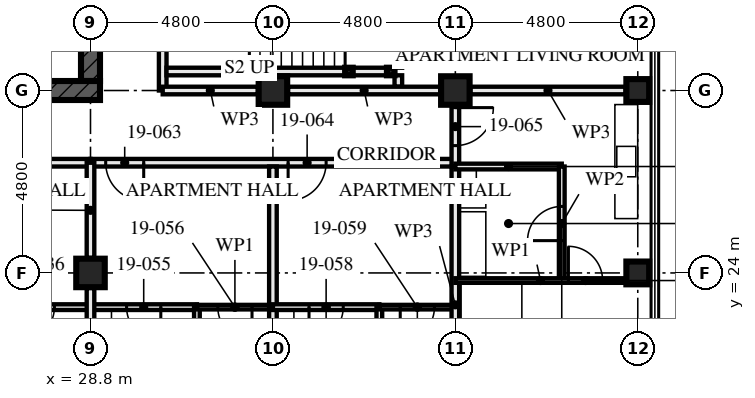
"""IFC4 building model, lengths in metres.
Left out: names, types, materials, properties, quantities, classifications, styles, units other than length and angle.
Written with IfcOpenShell. Run it as: python <this file> out.ifc"""

import sys

from ifc_helpers import new_model, si_unit, direction, frame, frame_2d, origin, origin_2d, place, context, subcontext, project, spatial, rectangle, hollow_rectangle, extrude, element, fill, save


model = new_model("IFC4")
c1 = context("Model", 3, precision=1e-05, world=origin(), true_north=direction((0.0, 1.0)))
c2 = subcontext(c1, "Body", "Model", "MODEL_VIEW")
j1 = project(units=[si_unit("LENGTHUNIT", "METRE"), si_unit("PLANEANGLEUNIT", "RADIAN")], contexts=[c1])
p1 = place(None, origin())
s1 = spatial("IfcSite", under=j1, at=p1, CompositionType="ELEMENT")
p2 = place(p1, origin())
s2 = spatial("IfcBuilding", under=s1, at=p2, CompositionType="ELEMENT")
p3 = place(p2, frame((0.0, 0.0, 72.5)))
s3 = spatial("IfcBuildingStorey", under=s2, at=p3, CompositionType="ELEMENT", Elevation=72.5)
for number, where, z_axis, x_axis in (
    (1, (28.8, 24.0, 0.0), (0.0, 0.0, 1.0), (1.0, 0.0, 0.0)),
    (2, (33.6, 28.8, 0.0), (0.0, 0.0, 1.0), (0.0, 1.0, 0.0)),
    (3, (38.4, 28.8, 0.0), (0.0, 0.0, 1.0), (0.0, 1.0, 0.0)),
):
    element("IfcColumn", number, at=place(p3, frame(where, z_axis=z_axis, x_axis=x_axis)), inside=s3, PredefinedType="COLUMN", context=c2, shape_type="SweptSolid", body=[
        extrude(hollow_rectangle(XDim=0.75, YDim=0.75, WallThickness=0.08, at=origin_2d()), origin(), (0.0, 0.0, 1.0), 3.5),
    ])
for number, where, z_axis, x_axis in (
    (4, (43.2, 24.0, 0.0), (0.0, 0.0, 1.0), (1.0, 0.0, 0.0)),
    (5, (43.2, 28.8, 0.0), (0.0, 0.0, 1.0), (0.0, 1.0, 0.0)),
):
    element("IfcColumn", number, at=place(p3, frame(where, z_axis=z_axis, x_axis=x_axis)), inside=s3, PredefinedType="COLUMN", context=c2, shape_type="SweptSolid", body=[
        extrude(hollow_rectangle(XDim=0.6, YDim=0.6, WallThickness=0.08, at=origin_2d()), origin(), (0.0, 0.0, 1.0), 3.5),
    ])
p4 = place(p3, frame((14.15, 28.8, -0.17), z_axis=(0.0, 0.0, 1.0), x_axis=(1.0, 0.0, 0.0)))
e6 = element("IfcWall", 6, at=p4, inside=s3, PredefinedType="SHEAR", context=c2, shape_type="SweptSolid", body=[
    extrude(rectangle(XDim=14.9, YDim=0.5, at=frame_2d((7.45, 0.0))), origin(), (0.0, 0.0, 1.0), 3.5),
])
p5 = place(p4, frame((6.85, 0.0, 0.17)))
e7 = element("IfcOpeningElement", 7, at=p5, cuts=e6, PredefinedType="OPENING", context=c2, shape_type="SweptSolid", body=[
    extrude(rectangle(XDim=1.2, YDim=2.1, at=frame_2d((0.6, 1.05))), frame((0.0, 0.26, 0.0), z_axis=(0.0, -1.0, 0.0), x_axis=(1.0, 0.0, 0.0)), (0.0, 0.0, 1.0), 0.521),
])
p6 = place(p3, frame((28.8, 29.05, -0.17), z_axis=(0.0, 0.0, 1.0), x_axis=(0.0, 1.0, 0.0)))
e8 = element("IfcWall", 8, at=p6, inside=s3, PredefinedType="SHEAR", context=c2, shape_type="SweptSolid", body=[
    extrude(rectangle(XDim=13.9, YDim=0.5, at=frame_2d((6.95, 0.0))), origin(), (0.0, 0.0, 1.0), 3.5),
])
p7 = place(p6, frame((6.35, 0.0, 0.17)))
e9 = element("IfcOpeningElement", 9, at=p7, cuts=e8, PredefinedType="OPENING", context=c2, shape_type="SweptSolid", body=[
    extrude(rectangle(XDim=1.2, YDim=2.1, at=frame_2d((0.6, 1.05))), frame((0.0, 0.26, 0.0), z_axis=(0.0, -1.0, 0.0), x_axis=(1.0, 0.0, 0.0)), (0.0, 0.0, 1.0), 0.521),
])
for number, where, z_axis, x_axis in (
    (10, (36.7, 29.3, 0.0), (0.0, 0.0, 1.0), (1.0, 0.0, 0.0)),
    (11, (35.6, 29.3, 0.0), (0.0, 0.0, 1.0), (1.0, 0.0, 0.0)),
):
    element("IfcColumn", number, at=place(p3, frame(where, z_axis=z_axis, x_axis=x_axis)), inside=s3, PredefinedType="COLUMN", context=c2, shape_type="SweptSolid", body=[
        extrude(hollow_rectangle(XDim=0.2, YDim=0.2, WallThickness=0.008, at=origin_2d()), origin(), (0.0, 0.0, 1.0), 3.33),
    ])
p8 = place(p3, frame((26.0, 23.1, 0.0), z_axis=(0.0, 0.0, 1.0), x_axis=(1.0, 0.0, 0.0)))
e12 = element("IfcWall", 12, at=p8, inside=s3, PredefinedType="PARTITIONING", context=c2, shape_type="SweptSolid", body=[
    extrude(rectangle(XDim=2.8, YDim=0.15, at=frame_2d((1.4, 0.0))), origin(), (0.0, 0.0, 1.0), 3.33),
])
p9 = place(p8, frame((0.95, 0.0, 0.0)))
e13 = element("IfcOpeningElement", 13, at=p9, cuts=e12, PredefinedType="OPENING", context=c2, shape_type="SweptSolid", body=[
    extrude(rectangle(XDim=0.9, YDim=2.1, at=frame_2d((0.45, 1.05))), frame((0.0, 0.085, 0.0), z_axis=(0.0, -1.0, 0.0), x_axis=(1.0, 0.0, 0.0)), (0.0, 0.0, 1.0), 0.171),
])
p10 = place(p3, frame((14.4, 26.9, 0.0), z_axis=(0.0, 0.0, 1.0), x_axis=(1.0, 0.0, 0.0)))
e14 = element("IfcWall", 14, at=p10, inside=s3, PredefinedType="PARTITIONING", context=c2, shape_type="SweptSolid", body=[
    extrude(rectangle(XDim=14.4, YDim=0.2, at=frame_2d((7.2, 0.0))), origin(), (0.0, 0.0, 1.0), 2.55),
])
p11 = place(p10, frame((1.4, 0.0, 0.0)))
e15 = element("IfcOpeningElement", 15, at=p11, cuts=e14, PredefinedType="OPENING", context=c2, shape_type="SweptSolid", body=[
    extrude(rectangle(XDim=1.0, YDim=2.1, at=frame_2d((0.5, 1.05))), frame((0.0, 0.111, 0.0), z_axis=(0.0, -1.0, 0.0), x_axis=(1.0, 0.0, 0.0)), (0.0, 0.0, 1.0), 0.221),
])
p12 = place(p10, frame((3.65, 0.0, 0.0)))
e16 = element("IfcOpeningElement", 16, at=p12, cuts=e14, PredefinedType="OPENING", context=c2, shape_type="SweptSolid", body=[
    extrude(rectangle(XDim=0.9, YDim=2.1, at=frame_2d((0.45, 1.05))), frame((0.0, 0.111, 0.0), z_axis=(0.0, -1.0, 0.0), x_axis=(1.0, 0.0, 0.0)), (0.0, 0.0, 1.0), 0.221),
])
p13 = place(p10, frame((5.2, 0.0, 0.0)))
e17 = element("IfcOpeningElement", 17, at=p13, cuts=e14, PredefinedType="OPENING", context=c2, shape_type="SweptSolid", body=[
    extrude(rectangle(XDim=1.0, YDim=2.1, at=frame_2d((0.5, 1.05))), frame((0.0, 0.111, 0.0), z_axis=(0.0, -1.0, 0.0), x_axis=(1.0, 0.0, 0.0)), (0.0, 0.0, 1.0), 0.221),
])
p14 = place(p10, frame((10.0, 0.0, 0.0)))
e18 = element("IfcOpeningElement", 18, at=p14, cuts=e14, PredefinedType="OPENING", context=c2, shape_type="SweptSolid", body=[
    extrude(rectangle(XDim=1.0, YDim=2.1, at=frame_2d((0.5, 1.05))), frame((0.0, 0.111, 0.0), z_axis=(0.0, -1.0, 0.0), x_axis=(1.0, 0.0, 0.0)), (0.0, 0.0, 1.0), 0.221),
])
p15 = place(p3, frame((31.6, 20.1, 0.0), z_axis=(0.0, 0.0, 1.0), x_axis=(0.0, 1.0, 0.0)))
e19 = element("IfcWall", 19, at=p15, inside=s3, PredefinedType="PARTITIONING", context=c2, shape_type="SweptSolid", body=[
    extrude(rectangle(XDim=3.0, YDim=0.15, at=frame_2d((1.5, 0.0))), origin(), (0.0, 0.0, 1.0), 3.33),
])
p16 = place(p3, frame((28.8, 23.1, 0.0), z_axis=(0.0, 0.0, 1.0), x_axis=(1.0, 0.0, 0.0)))
e20 = element("IfcWall", 20, at=p16, inside=s3, PredefinedType="PARTITIONING", context=c2, shape_type="SweptSolid", body=[
    extrude(rectangle(XDim=2.8, YDim=0.15, at=frame_2d((1.4, 0.0))), origin(), (0.0, 0.0, 1.0), 3.33),
])
p17 = place(p16, frame((0.95, 0.0, 0.0)))
e21 = element("IfcOpeningElement", 21, at=p17, cuts=e20, PredefinedType="OPENING", context=c2, shape_type="SweptSolid", body=[
    extrude(rectangle(XDim=0.9, YDim=2.1, at=frame_2d((0.45, 1.05))), frame((0.0, 0.085, 0.0), z_axis=(0.0, -1.0, 0.0), x_axis=(1.0, 0.0, 0.0)), (0.0, 0.0, 1.0), 0.171),
])
p18 = place(p3, frame((31.6, 23.1, 0.0), z_axis=(0.0, 0.0, 1.0), x_axis=(1.0, 0.0, 0.0)))
e22 = element("IfcWall", 22, at=p18, inside=s3, PredefinedType="PARTITIONING", context=c2, shape_type="SweptSolid", body=[
    extrude(rectangle(XDim=2.0, YDim=0.12, at=frame_2d((1.0, 0.0))), origin(), (0.0, 0.0, 1.0), 3.33),
])
p19 = place(p18, frame((0.55, 0.0, 0.0)))
e23 = element("IfcOpeningElement", 23, at=p19, cuts=e22, PredefinedType="OPENING", context=c2, shape_type="SweptSolid", body=[
    extrude(rectangle(XDim=0.9, YDim=2.1, at=frame_2d((0.45, 1.05))), frame((0.0, 0.071, 0.0), z_axis=(0.0, -1.0, 0.0), x_axis=(1.0, 0.0, 0.0)), (0.0, 0.0, 1.0), 0.141),
])
p20 = place(p3, frame((33.6, 14.72, 0.0), z_axis=(0.0, 0.0, 1.0), x_axis=(0.0, 1.0, 0.0)))
e24 = element("IfcWall", 24, at=p20, inside=s3, PredefinedType="PARTITIONING", context=c2, shape_type="SweptSolid", body=[
    extrude(rectangle(XDim=12.08, YDim=0.2, at=frame_2d((6.04, 0.0))), origin(), (0.0, 0.0, 1.0), 2.55),
])
p21 = place(p3, frame((36.4, 20.1, 0.0), z_axis=(0.0, 0.0, 1.0), x_axis=(0.0, 1.0, 0.0)))
e25 = element("IfcWall", 25, at=p21, inside=s3, PredefinedType="PARTITIONING", context=c2, shape_type="SweptSolid", body=[
    extrude(rectangle(XDim=3.0, YDim=0.15, at=frame_2d((1.5, 0.0))), origin(), (0.0, 0.0, 1.0), 3.33),
])
p22 = place(p3, frame((33.6, 23.1, 0.0), z_axis=(0.0, 0.0, 1.0), x_axis=(1.0, 0.0, 0.0)))
e26 = element("IfcWall", 26, at=p22, inside=s3, PredefinedType="PARTITIONING", context=c2, shape_type="SweptSolid", body=[
    extrude(rectangle(XDim=2.8, YDim=0.15, at=frame_2d((1.4, 0.0))), origin(), (0.0, 0.0, 1.0), 3.33),
])
p23 = place(p22, frame((0.95, 0.0, 0.0)))
e27 = element("IfcOpeningElement", 27, at=p23, cuts=e26, PredefinedType="OPENING", context=c2, shape_type="SweptSolid", body=[
    extrude(rectangle(XDim=0.9, YDim=2.1, at=frame_2d((0.45, 1.05))), frame((0.0, 0.085, 0.0), z_axis=(0.0, -1.0, 0.0), x_axis=(1.0, 0.0, 0.0)), (0.0, 0.0, 1.0), 0.171),
])
p24 = place(p3, frame((36.4, 23.1, 0.0), z_axis=(0.0, 0.0, 1.0), x_axis=(1.0, 0.0, 0.0)))
e28 = element("IfcWall", 28, at=p24, inside=s3, PredefinedType="PARTITIONING", context=c2, shape_type="SweptSolid", body=[
    extrude(rectangle(XDim=2.0, YDim=0.12, at=frame_2d((1.0, 0.0))), origin(), (0.0, 0.0, 1.0), 3.33),
])
p25 = place(p24, frame((0.55, 0.0, 0.0)))
e29 = element("IfcOpeningElement", 29, at=p25, cuts=e28, PredefinedType="OPENING", context=c2, shape_type="SweptSolid", body=[
    extrude(rectangle(XDim=0.9, YDim=2.1, at=frame_2d((0.45, 1.05))), frame((0.0, 0.071, 0.0), z_axis=(0.0, -1.0, 0.0), x_axis=(1.0, 0.0, 0.0)), (0.0, 0.0, 1.0), 0.141),
])
p26 = place(p3, frame((38.4, 19.52, 0.0), z_axis=(0.0, 0.0, 1.0), x_axis=(0.0, 1.0, 0.0)))
e30 = element("IfcWall", 30, at=p26, inside=s3, PredefinedType="PARTITIONING", context=c2, shape_type="SweptSolid", body=[
    extrude(rectangle(XDim=7.28, YDim=0.2, at=frame_2d((3.64, 0.0))), origin(), (0.0, 0.0, 1.0), 2.55),
])
p27 = place(p3, frame((41.2, 23.8, 0.0), z_axis=(0.0, 0.0, 1.0), x_axis=(0.0, 1.0, 0.0)))
e31 = element("IfcWall", 31, at=p27, inside=s3, PredefinedType="PARTITIONING", context=c2, shape_type="SweptSolid", body=[
    extrude(rectangle(XDim=3.0, YDim=0.15, at=frame_2d((1.5, 0.0))), origin(), (0.0, 0.0, 1.0), 2.55),
])
p28 = place(p27, frame((1.05, 0.0, 0.0)))
e32 = element("IfcOpeningElement", 32, at=p28, cuts=e31, PredefinedType="OPENING", context=c2, shape_type="SweptSolid", body=[
    extrude(rectangle(XDim=0.9, YDim=2.1, at=frame_2d((0.45, 1.05))), frame((0.0, 0.085, 0.0), z_axis=(0.0, -1.0, 0.0), x_axis=(1.0, 0.0, 0.0)), (0.0, 0.0, 1.0), 0.171),
])
p29 = place(p3, frame((38.4, 26.8, 0.0), z_axis=(0.0, 0.0, 1.0), x_axis=(1.0, 0.0, 0.0)))
e33 = element("IfcWall", 33, at=p29, inside=s3, PredefinedType="PARTITIONING", context=c2, shape_type="SweptSolid", body=[
    extrude(rectangle(XDim=2.8, YDim=0.15, at=frame_2d((1.4, 0.0))), origin(), (0.0, 0.0, 1.0), 3.33),
])
p30 = place(p3, frame((38.4, 23.8, 0.0), z_axis=(0.0, 0.0, 1.0), x_axis=(1.0, 0.0, 0.0)))
e34 = element("IfcWall", 34, at=p30, inside=s3, PredefinedType="PARTITIONING", context=c2, shape_type="SweptSolid", body=[
    extrude(rectangle(XDim=4.48, YDim=0.12, at=frame_2d((2.24, 0.0))), origin(), (0.0, 0.0, 1.0), 3.33),
])
p31 = place(p30, frame((2.975, 0.0, 0.0)))
e35 = element("IfcOpeningElement", 35, at=p31, cuts=e34, PredefinedType="OPENING", context=c2, shape_type="SweptSolid", body=[
    extrude(rectangle(XDim=0.9, YDim=2.1, at=frame_2d((0.45, 1.05))), frame((0.0, 0.071, 0.0), z_axis=(0.0, -1.0, 0.0), x_axis=(1.0, 0.0, 0.0)), (0.0, 0.0, 1.0), 0.141),
])
p32 = place(p3, frame((28.8, 26.9, 0.0), z_axis=(0.0, 0.0, 1.0), x_axis=(1.0, 0.0, 0.0)))
e36 = element("IfcWall", 36, at=p32, inside=s3, PredefinedType="PARTITIONING", context=c2, shape_type="SweptSolid", body=[
    extrude(rectangle(XDim=9.6, YDim=0.2, at=frame_2d((4.8, 0.0))), origin(), (0.0, 0.0, 1.0), 3.33),
])
p33 = place(p32, frame((0.4, 0.0, 0.0)))
e37 = element("IfcOpeningElement", 37, at=p33, cuts=e36, PredefinedType="OPENING", context=c2, shape_type="SweptSolid", body=[
    extrude(rectangle(XDim=1.0, YDim=2.1, at=frame_2d((0.5, 1.05))), frame((0.0, 0.111, 0.0), z_axis=(0.0, -1.0, 0.0), x_axis=(1.0, 0.0, 0.0)), (0.0, 0.0, 1.0), 0.221),
])
p34 = place(p32, frame((5.2, 0.0, 0.0)))
e38 = element("IfcOpeningElement", 38, at=p34, cuts=e36, PredefinedType="OPENING", context=c2, shape_type="SweptSolid", body=[
    extrude(rectangle(XDim=1.0, YDim=2.1, at=frame_2d((0.5, 1.05))), frame((0.0, 0.111, 0.0), z_axis=(0.0, -1.0, 0.0), x_axis=(1.0, 0.0, 0.0)), (0.0, 0.0, 1.0), 0.221),
])
p35 = place(p3, frame((38.4, 26.8, 0.0), z_axis=(0.0, 0.0, 1.0), x_axis=(0.0, 1.0, 0.0)))
e39 = element("IfcWall", 39, at=p35, inside=s3, PredefinedType="PARTITIONING", context=c2, shape_type="SweptSolid", body=[
    extrude(rectangle(XDim=1.605, YDim=0.2, at=frame_2d((0.802, 0.0))), origin(), (0.0, 0.0, 1.0), 3.33),
])
p36 = place(p35, frame((0.55, 0.0, 0.0)))
e40 = element("IfcOpeningElement", 40, at=p36, cuts=e39, PredefinedType="OPENING", context=c2, shape_type="SweptSolid", body=[
    extrude(rectangle(XDim=1.0, YDim=2.1, at=frame_2d((0.5, 1.05))), frame((0.0, 0.111, 0.0), z_axis=(0.0, -1.0, 0.0), x_axis=(1.0, 0.0, 0.0)), (0.0, 0.0, 1.0), 0.221),
])
p37 = place(p3, frame((36.6, 29.3, 0.0), z_axis=(0.0, 0.0, 1.0), x_axis=(-1.0, 0.0, 0.0)))
e41 = element("IfcWall", 41, at=p37, inside=s3, PredefinedType="SOLIDWALL", context=c2, shape_type="SweptSolid", body=[
    extrude(rectangle(XDim=0.9, YDim=0.2, at=frame_2d((0.45, 0.0))), origin(), (0.0, 0.0, 1.0), 2.99),
])
p38 = place(p3, frame((35.5, 29.3, 0.0), z_axis=(0.0, 0.0, 1.0), x_axis=(-1.0, 0.0, 0.0)))
e42 = element("IfcWall", 42, at=p38, inside=s3, PredefinedType="SOLIDWALL", context=c2, shape_type="SweptSolid", body=[
    extrude(rectangle(XDim=4.7, YDim=0.2, at=frame_2d((2.35, 0.0))), origin(), (0.0, 0.0, 1.0), 2.99),
])
p39 = place(p3, frame((36.9, 28.9, 0.0), z_axis=(0.0, 0.0, 1.0), x_axis=(0.0, 1.0, 0.0)))
e43 = element("IfcWall", 43, at=p39, inside=s3, PredefinedType="SOLIDWALL", context=c2, shape_type="SweptSolid", body=[
    extrude(rectangle(XDim=0.3, YDim=0.2, at=frame_2d((0.15, 0.0))), origin(), (0.0, 0.0, 1.0), 3.33),
])
p40 = place(p3, frame((36.9, 29.4, 0.0), z_axis=(0.0, 0.0, 1.0), x_axis=(0.0, 1.0, 0.0)))
e44 = element("IfcWall", 44, at=p40, inside=s3, PredefinedType="SOLIDWALL", context=c2, shape_type="SweptSolid", body=[
    extrude(rectangle(XDim=2.6, YDim=0.2, at=frame_2d((1.3, 0.0))), origin(), (0.0, 0.0, 1.0), 3.33),
])
p41 = place(p3, frame((30.7, 28.8, 0.0), z_axis=(0.0, 0.0, 1.0), x_axis=(0.0, 1.0, 0.0)))
e45 = element("IfcWall", 45, at=p41, inside=s3, PredefinedType="PARTITIONING", context=c2, shape_type="SweptSolid", body=[
    extrude(rectangle(XDim=14.4, YDim=0.2, at=frame_2d((7.2, 0.0))), origin(), (0.0, 0.0, 1.0), 2.55),
])
p42 = place(p41, frame((1.4, 0.0, 0.0)))
e46 = element("IfcOpeningElement", 46, at=p42, cuts=e45, PredefinedType="OPENING", context=c2, shape_type="SweptSolid", body=[
    extrude(rectangle(XDim=1.0, YDim=2.1, at=frame_2d((0.5, 1.05))), frame((0.0, 0.111, 0.0), z_axis=(0.0, -1.0, 0.0), x_axis=(1.0, 0.0, 0.0)), (0.0, 0.0, 1.0), 0.221),
])
p43 = place(p41, frame((4.1, 0.0, 0.0)))
e47 = element("IfcOpeningElement", 47, at=p43, cuts=e45, PredefinedType="OPENING", context=c2, shape_type="SweptSolid", body=[
    extrude(rectangle(XDim=1.0, YDim=2.1, at=frame_2d((0.5, 1.05))), frame((0.0, 0.111, 0.0), z_axis=(0.0, -1.0, 0.0), x_axis=(1.0, 0.0, 0.0)), (0.0, 0.0, 1.0), 0.221),
])
p44 = place(p41, frame((5.975, 0.0, 0.0)))
e48 = element("IfcOpeningElement", 48, at=p44, cuts=e45, PredefinedType="OPENING", context=c2, shape_type="SweptSolid", body=[
    extrude(rectangle(XDim=1.0, YDim=2.1, at=frame_2d((0.5, 1.05))), frame((0.0, 0.111, 0.0), z_axis=(0.0, -1.0, 0.0), x_axis=(1.0, 0.0, 0.0)), (0.0, 0.0, 1.0), 0.221),
])
p45 = place(p41, frame((10.0, 0.0, 0.0)))
e49 = element("IfcOpeningElement", 49, at=p45, cuts=e45, PredefinedType="OPENING", context=c2, shape_type="SweptSolid", body=[
    extrude(rectangle(XDim=1.0, YDim=2.1, at=frame_2d((0.5, 1.05))), frame((0.0, 0.111, 0.0), z_axis=(0.0, -1.0, 0.0), x_axis=(1.0, 0.0, 0.0)), (0.0, 0.0, 1.0), 0.221),
])
p46 = place(p3, frame((28.8, 19.595, 0.0), z_axis=(0.0, 0.0, 1.0), x_axis=(0.0, 1.0, 0.0)))
e50 = element("IfcWall", 50, at=p46, inside=s3, PredefinedType="PARTITIONING", context=c2, shape_type="SweptSolid", body=[
    extrude(rectangle(XDim=4.01, YDim=0.2, at=frame_2d((2.005, 0.0))), origin(), (0.0, 0.0, 1.0), 2.32),
])
p47 = place(p3, frame((28.8, 24.395, 0.0), z_axis=(0.0, 0.0, 1.0), x_axis=(0.0, 1.0, 0.0)))
e51 = element("IfcWall", 51, at=p47, inside=s3, PredefinedType="PARTITIONING", context=c2, shape_type="SweptSolid", body=[
    extrude(rectangle(XDim=2.505, YDim=0.2, at=frame_2d((1.252, 0.0))), origin(), (0.0, 0.0, 1.0), 2.32),
])
p48 = place(p3, frame((42.88, 28.8, 0.0), z_axis=(0.0, 0.0, 1.0), x_axis=(-1.0, 0.0, 0.0)))
e52 = element("IfcWall", 52, at=p48, inside=s3, PredefinedType="PARTITIONING", context=c2, shape_type="SweptSolid", body=[
    extrude(rectangle(XDim=4.085, YDim=0.2, at=frame_2d((2.042, 0.0))), origin(), (0.0, 0.0, 1.0), 2.32),
])
p49 = place(p3, frame((38.005, 28.8, 0.0), z_axis=(0.0, 0.0, 1.0), x_axis=(-1.0, 0.0, 0.0)))
e53 = element("IfcWall", 53, at=p49, inside=s3, PredefinedType="PARTITIONING", context=c2, shape_type="SweptSolid", body=[
    extrude(rectangle(XDim=4.01, YDim=0.2, at=frame_2d((2.005, 0.0))), origin(), (0.0, 0.0, 1.0), 2.32),
])
p50 = place(p3, frame((33.205, 28.8, 0.0), z_axis=(0.0, 0.0, 1.0), x_axis=(-1.0, 0.0, 0.0)))
e54 = element("IfcWall", 54, at=p50, inside=s3, PredefinedType="PARTITIONING", context=c2, shape_type="SweptSolid", body=[
    extrude(rectangle(XDim=2.505, YDim=0.2, at=frame_2d((1.252, 0.0))), origin(), (0.0, 0.0, 1.0), 2.32),
])
p51 = place(p9, frame((0.9, 0.0, 0.0), z_axis=(0.0, 0.0, 1.0), x_axis=(-1.0, 0.0, 0.0)))
e55 = element("IfcDoor", 55, at=p51, inside=s3, OperationType="SINGLE_SWING_LEFT", PredefinedType="DOOR", context=c2, shape_type="SweptSolid", body=[
    extrude(rectangle(XDim=0.9, YDim=2.1, at=frame_2d((0.45, 1.05))), frame((0.0, 0.022, 0.0), z_axis=(0.0, -1.0, 0.0), x_axis=(1.0, 0.0, 0.0)), (0.0, 0.0, 1.0), 0.044),
])
fill(e13, e55)
p52 = place(p17, frame((0.9, 0.0, 0.0), z_axis=(0.0, 0.0, 1.0), x_axis=(-1.0, 0.0, 0.0)))
e56 = element("IfcDoor", 56, at=p52, inside=s3, OperationType="SINGLE_SWING_RIGHT", PredefinedType="DOOR", context=c2, shape_type="SweptSolid", body=[
    extrude(rectangle(XDim=0.9, YDim=2.1, at=frame_2d((0.45, 1.05))), frame((0.0, 0.022, 0.0), z_axis=(0.0, -1.0, 0.0), x_axis=(1.0, 0.0, 0.0)), (0.0, 0.0, 1.0), 0.044),
])
fill(e21, e56)
p53 = place(p19, frame((0.9, 0.0, 0.0), z_axis=(0.0, 0.0, 1.0), x_axis=(-1.0, 0.0, 0.0)))
e57 = element("IfcDoor", 57, at=p53, inside=s3, OperationType="SINGLE_SWING_RIGHT", PredefinedType="DOOR", context=c2, shape_type="SweptSolid", body=[
    extrude(rectangle(XDim=0.9, YDim=2.1, at=frame_2d((0.45, 1.05))), frame((0.0, 0.022, 0.0), z_axis=(0.0, -1.0, 0.0), x_axis=(1.0, 0.0, 0.0)), (0.0, 0.0, 1.0), 0.044),
])
fill(e23, e57)
p54 = place(p23, frame((0.9, 0.0, 0.0), z_axis=(0.0, 0.0, 1.0), x_axis=(-1.0, 0.0, 0.0)))
e58 = element("IfcDoor", 58, at=p54, inside=s3, OperationType="SINGLE_SWING_LEFT", PredefinedType="DOOR", context=c2, shape_type="SweptSolid", body=[
    extrude(rectangle(XDim=0.9, YDim=2.1, at=frame_2d((0.45, 1.05))), frame((0.0, 0.022, 0.0), z_axis=(0.0, -1.0, 0.0), x_axis=(1.0, 0.0, 0.0)), (0.0, 0.0, 1.0), 0.044),
])
fill(e27, e58)
p55 = place(p25, frame((0.9, 0.0, 0.0), z_axis=(0.0, 0.0, 1.0), x_axis=(-1.0, 0.0, 0.0)))
e59 = element("IfcDoor", 59, at=p55, inside=s3, OperationType="SINGLE_SWING_LEFT", PredefinedType="DOOR", context=c2, shape_type="SweptSolid", body=[
    extrude(rectangle(XDim=0.9, YDim=2.1, at=frame_2d((0.45, 1.05))), frame((0.0, 0.022, 0.0), z_axis=(0.0, -1.0, 0.0), x_axis=(1.0, 0.0, 0.0)), (0.0, 0.0, 1.0), 0.044),
])
fill(e29, e59)
p56 = place(p28, origin())
e60 = element("IfcDoor", 60, at=p56, inside=s3, OperationType="SINGLE_SWING_RIGHT", PredefinedType="DOOR", context=c2, shape_type="SweptSolid", body=[
    extrude(rectangle(XDim=0.9, YDim=2.1, at=frame_2d((0.45, 1.05))), frame((0.0, 0.022, 0.0), z_axis=(0.0, -1.0, 0.0), x_axis=(1.0, 0.0, 0.0)), (0.0, 0.0, 1.0), 0.044),
])
fill(e32, e60)
p57 = place(p31, origin())
e61 = element("IfcDoor", 61, at=p57, inside=s3, OperationType="SINGLE_SWING_RIGHT", PredefinedType="DOOR", context=c2, shape_type="SweptSolid", body=[
    extrude(rectangle(XDim=0.9, YDim=2.1, at=frame_2d((0.45, 1.05))), frame((0.0, 0.022, 0.0), z_axis=(0.0, -1.0, 0.0), x_axis=(1.0, 0.0, 0.0)), (0.0, 0.0, 1.0), 0.044),
])
fill(e35, e61)
p58 = place(p33, frame((1.0, 0.0, 0.0), z_axis=(0.0, 0.0, 1.0), x_axis=(-1.0, 0.0, 0.0)))
e62 = element("IfcDoor", 62, at=p58, inside=s3, OperationType="SINGLE_SWING_RIGHT", PredefinedType="DOOR", context=c2, shape_type="SweptSolid", body=[
    extrude(rectangle(XDim=1.0, YDim=2.1, at=frame_2d((0.5, 1.05))), frame((0.0, 0.027, 0.0), z_axis=(0.0, -1.0, 0.0), x_axis=(1.0, 0.0, 0.0)), (0.0, 0.0, 1.0), 0.054),
])
fill(e37, e62)
p59 = place(p34, frame((1.0, 0.0, 0.0), z_axis=(0.0, 0.0, 1.0), x_axis=(-1.0, 0.0, 0.0)))
e63 = element("IfcDoor", 63, at=p59, inside=s3, OperationType="SINGLE_SWING_LEFT", PredefinedType="DOOR", context=c2, shape_type="SweptSolid", body=[
    extrude(rectangle(XDim=1.0, YDim=2.1, at=frame_2d((0.5, 1.05))), frame((0.0, 0.027, 0.0), z_axis=(0.0, -1.0, 0.0), x_axis=(1.0, 0.0, 0.0)), (0.0, 0.0, 1.0), 0.054),
])
fill(e38, e63)
p60 = place(p36, frame((1.0, 0.0, 0.0), z_axis=(0.0, 0.0, 1.0), x_axis=(-1.0, 0.0, 0.0)))
e64 = element("IfcDoor", 64, at=p60, inside=s3, OperationType="SINGLE_SWING_RIGHT", PredefinedType="DOOR", context=c2, shape_type="SweptSolid", body=[
    extrude(rectangle(XDim=1.0, YDim=2.1, at=frame_2d((0.5, 1.05))), frame((0.0, 0.027, 0.0), z_axis=(0.0, -1.0, 0.0), x_axis=(1.0, 0.0, 0.0)), (0.0, 0.0, 1.0), 0.054),
])
fill(e40, e64)
save(model, sys.argv[1])
